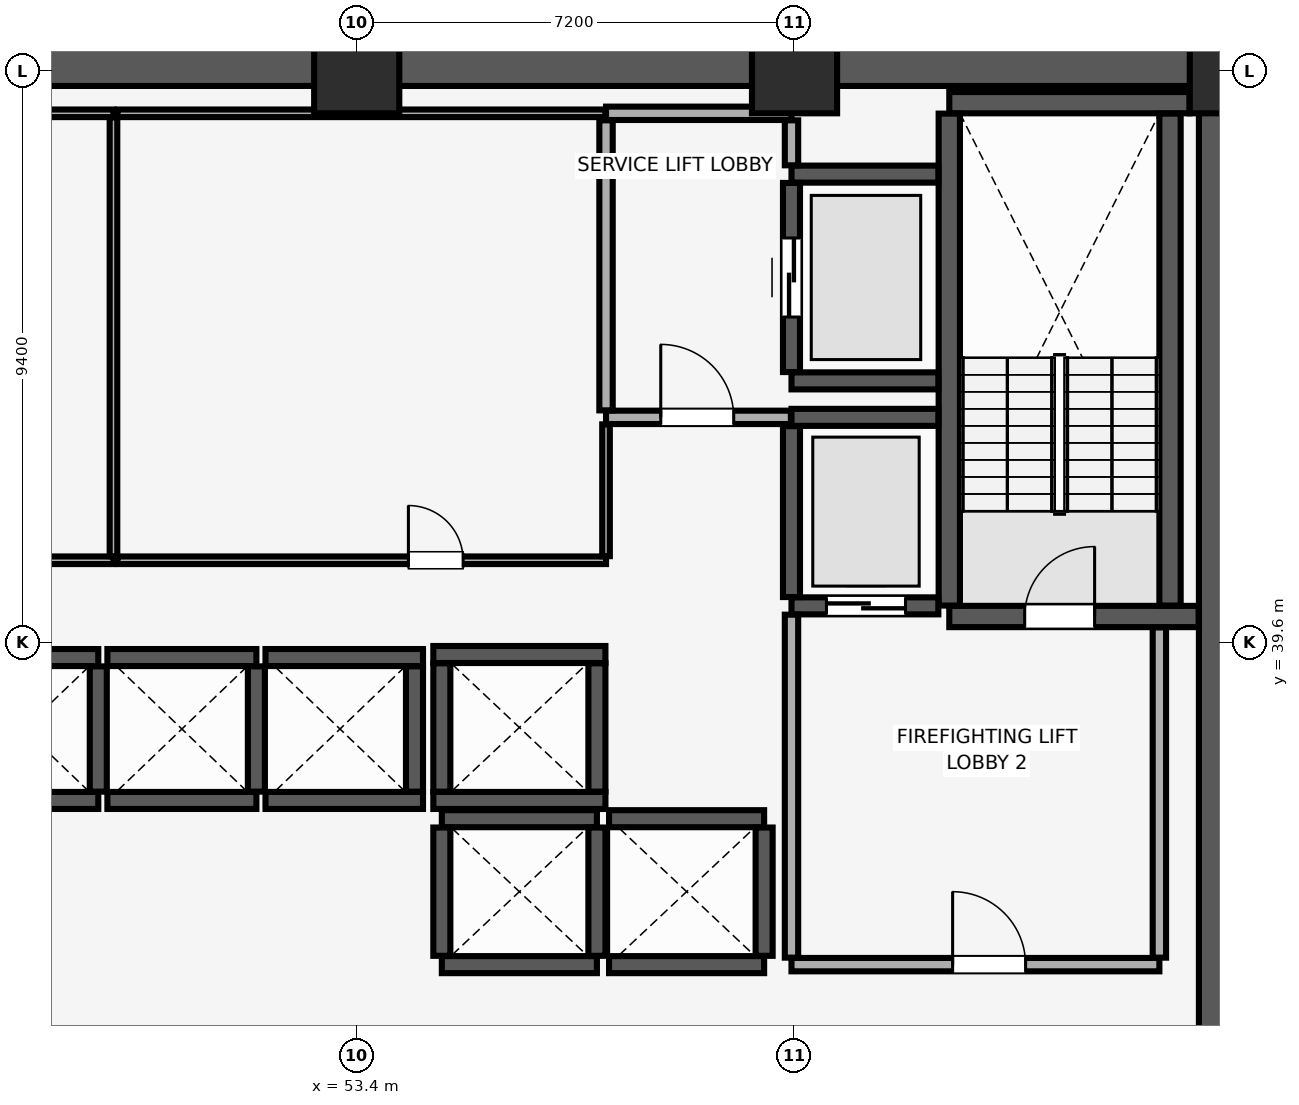
"""IFC4 building model, lengths in metres.
Left out: names, types, materials, properties, quantities, classifications, styles, units other than length and angle.
Written with IfcOpenShell. Run it as: python <this file> out.ifc"""

import sys

from ifc_helpers import new_model, si_unit, direction, frame, frame_2d, origin, origin_2d, place, context, subcontext, project, spatial, rectangle, extrude, element, fill, save


model = new_model("IFC4")
c1 = context("Model", 3, precision=1e-05, world=origin(), true_north=direction((0.0, 1.0)))
c2 = subcontext(c1, "Body", "Model", "MODEL_VIEW")
j1 = project(units=[si_unit("LENGTHUNIT", "METRE"), si_unit("PLANEANGLEUNIT", "RADIAN")], contexts=[c1])
p1 = place(None, origin())
s1 = spatial("IfcSite", under=j1, at=p1, CompositionType="ELEMENT")
p2 = place(p1, origin())
s2 = spatial("IfcBuilding", under=s1, at=p2, CompositionType="ELEMENT")
p3 = place(p2, frame((0.0, 0.0, 19.4)))
s3 = spatial("IfcBuildingStorey", under=s2, at=p3, CompositionType="ELEMENT", Elevation=19.4)
for number, where, z_axis, x_axis in (
    (1, (53.4, 49.0, 0.0), (0.0, 0.0, 1.0), (1.0, 0.0, 0.0)),
    (2, (60.6, 49.0, 0.0), (0.0, 0.0, 1.0), (1.0, 0.0, 0.0)),
    (3, (67.8, 49.0, 0.0), (0.0, 0.0, 1.0), (1.0, 0.0, 0.0)),
):
    element("IfcColumn", number, at=place(p3, frame(where, z_axis=z_axis, x_axis=x_axis)), inside=s3, PredefinedType="COLUMN", context=c2, shape_type="SweptSolid", body=[
        extrude(rectangle(XDim=1.4, YDim=1.4, at=origin_2d()), origin(), (0.0, 0.0, 1.0), 6.28),
    ])
p4 = place(p3, frame((16.2, 49.3, 0.0), z_axis=(0.0, 0.0, 1.0), x_axis=(1.0, 0.0, 0.0)))
e4 = element("IfcWall", 4, at=p4, inside=s3, PredefinedType="SHEAR", context=c2, shape_type="SweptSolid", body=[
    extrude(rectangle(XDim=51.6, YDim=1.1, at=frame_2d((25.8, 0.0))), origin(), (0.0, 0.0, 1.0), 6.28),
])
p5 = place(p3, frame((67.8, 29.4, 0.0), z_axis=(0.0, 0.0, 1.0), x_axis=(0.0, 1.0, 0.0)))
e5 = element("IfcWall", 5, at=p5, inside=s3, PredefinedType="SHEAR", context=c2, shape_type="SweptSolid", body=[
    extrude(rectangle(XDim=19.2, YDim=1.1, at=frame_2d((9.6, 0.0))), origin(), (0.0, 0.0, 1.0), 6.28),
])
p6 = place(p3, frame((63.145, 40.025, 0.0), z_axis=(0.0, 0.0, 1.0), x_axis=(1.0, 0.0, 0.0)))
e6 = element("IfcWall", 6, at=p6, inside=s3, PredefinedType="SHEAR", context=c2, shape_type="SweptSolid", body=[
    extrude(rectangle(XDim=4.1, YDim=0.35, at=frame_2d((2.05, 0.0))), origin(), (0.0, 0.0, 1.0), 6.28),
])
p7 = place(p6, frame((1.24, 0.0, 0.0)))
e7 = element("IfcOpeningElement", 7, at=p7, cuts=e6, PredefinedType="OPENING", context=c2, shape_type="SweptSolid", body=[
    extrude(rectangle(XDim=1.15, YDim=2.15, at=frame_2d((0.575, 1.075))), frame((0.0, 0.185, 0.0), z_axis=(0.0, -1.0, 0.0), x_axis=(1.0, 0.0, 0.0)), (0.0, 0.0, 1.0), 0.37),
])
p8 = place(p3, frame((63.145, 48.475, 0.0), z_axis=(0.0, 0.0, 1.0), x_axis=(1.0, 0.0, 0.0)))
e8 = element("IfcWall", 8, at=p8, inside=s3, PredefinedType="SHEAR", context=c2, shape_type="SweptSolid", body=[
    extrude(rectangle(XDim=3.95, YDim=0.35, at=frame_2d((1.975, 0.0))), origin(), (0.0, 0.0, 1.0), 6.28),
])
for number, where, z_axis, x_axis in (
    (9, (63.145, 40.205, 0.0), (0.0, 0.0, 1.0), (0.0, 1.0, 0.0)),
    (10, (66.775, 40.205, 0.0), (0.0, 0.0, 1.0), (0.0, 1.0, 0.0)),
):
    element("IfcWall", number, at=place(p3, frame(where, z_axis=z_axis, x_axis=x_axis)), inside=s3, PredefinedType="SHEAR", context=c2, shape_type="SweptSolid", body=[
        extrude(rectangle(XDim=8.09, YDim=0.35, at=frame_2d((4.045, 0.0))), origin(), (0.0, 0.0, 1.0), 6.28),
    ])
for number, where, z_axis, x_axis in (
    (11, (46.7, 37.0, 0.0), (0.0, 0.0, 1.0), (1.0, 0.0, 0.0)),
    (12, (46.7, 39.35, 0.0), (0.0, 0.0, 1.0), (1.0, 0.0, 0.0)),
):
    element("IfcWall", number, at=place(p3, frame(where, z_axis=z_axis, x_axis=x_axis)), inside=s3, PredefinedType="SHEAR", context=c2, shape_type="SweptSolid", body=[
        extrude(rectangle(XDim=2.45, YDim=0.28, at=frame_2d((1.225, 0.0))), origin(), (0.0, 0.0, 1.0), 6.28),
    ])
p9 = place(p3, frame((49.15, 37.145, 0.0), z_axis=(0.0, 0.0, 1.0), x_axis=(0.0, 1.0, 0.0)))
e13 = element("IfcWall", 13, at=p9, inside=s3, PredefinedType="SHEAR", context=c2, shape_type="SweptSolid", body=[
    extrude(rectangle(XDim=2.06, YDim=0.28, at=frame_2d((1.03, 0.0))), origin(), (0.0, 0.0, 1.0), 6.28),
])
for number, where, z_axis, x_axis in (
    (14, (49.3, 37.0, 0.0), (0.0, 0.0, 1.0), (1.0, 0.0, 0.0)),
    (15, (49.3, 39.35, 0.0), (0.0, 0.0, 1.0), (1.0, 0.0, 0.0)),
):
    element("IfcWall", number, at=place(p3, frame(where, z_axis=z_axis, x_axis=x_axis)), inside=s3, PredefinedType="SHEAR", context=c2, shape_type="SweptSolid", body=[
        extrude(rectangle(XDim=2.45, YDim=0.28, at=frame_2d((1.225, 0.0))), origin(), (0.0, 0.0, 1.0), 6.28),
    ])
p10 = place(p3, frame((51.75, 37.145, 0.0), z_axis=(0.0, 0.0, 1.0), x_axis=(0.0, 1.0, 0.0)))
e16 = element("IfcWall", 16, at=p10, inside=s3, PredefinedType="SHEAR", context=c2, shape_type="SweptSolid", body=[
    extrude(rectangle(XDim=2.06, YDim=0.28, at=frame_2d((1.03, 0.0))), origin(), (0.0, 0.0, 1.0), 6.28),
])
for number, where, z_axis, x_axis in (
    (17, (51.9, 37.0, 0.0), (0.0, 0.0, 1.0), (1.0, 0.0, 0.0)),
    (18, (51.9, 39.35, 0.0), (0.0, 0.0, 1.0), (1.0, 0.0, 0.0)),
):
    element("IfcWall", number, at=place(p3, frame(where, z_axis=z_axis, x_axis=x_axis)), inside=s3, PredefinedType="SHEAR", context=c2, shape_type="SweptSolid", body=[
        extrude(rectangle(XDim=2.59, YDim=0.28, at=frame_2d((1.295, 0.0))), origin(), (0.0, 0.0, 1.0), 6.28),
    ])
p11 = place(p3, frame((54.35, 37.145, 0.0), z_axis=(0.0, 0.0, 1.0), x_axis=(0.0, 1.0, 0.0)))
e19 = element("IfcWall", 19, at=p11, inside=s3, PredefinedType="SHEAR", context=c2, shape_type="SweptSolid", body=[
    extrude(rectangle(XDim=2.06, YDim=0.28, at=frame_2d((1.03, 0.0))), origin(), (0.0, 0.0, 1.0), 6.28),
])
for number, where, z_axis, x_axis in (
    (20, (54.8, 34.3, 0.0), (0.0, 0.0, 1.0), (1.0, 0.0, 0.0)),
    (21, (54.8, 36.7, 0.0), (0.0, 0.0, 1.0), (1.0, 0.0, 0.0)),
):
    element("IfcWall", number, at=place(p3, frame(where, z_axis=z_axis, x_axis=x_axis)), inside=s3, PredefinedType="SHEAR", context=c2, shape_type="SweptSolid", body=[
        extrude(rectangle(XDim=2.55, YDim=0.28, at=frame_2d((1.275, 0.0))), origin(), (0.0, 0.0, 1.0), 6.28),
    ])
for number, where, z_axis, x_axis in (
    (22, (54.8, 34.445, 0.0), (0.0, 0.0, 1.0), (0.0, 1.0, 0.0)),
    (23, (57.35, 34.445, 0.0), (0.0, 0.0, 1.0), (0.0, 1.0, 0.0)),
):
    element("IfcWall", number, at=place(p3, frame(where, z_axis=z_axis, x_axis=x_axis)), inside=s3, PredefinedType="SHEAR", context=c2, shape_type="SweptSolid", body=[
        extrude(rectangle(XDim=2.11, YDim=0.28, at=frame_2d((1.055, 0.0))), origin(), (0.0, 0.0, 1.0), 6.28),
    ])
for number, where, z_axis, x_axis in (
    (24, (57.55, 34.3, 0.0), (0.0, 0.0, 1.0), (1.0, 0.0, 0.0)),
    (25, (57.55, 36.7, 0.0), (0.0, 0.0, 1.0), (1.0, 0.0, 0.0)),
):
    element("IfcWall", number, at=place(p3, frame(where, z_axis=z_axis, x_axis=x_axis)), inside=s3, PredefinedType="SHEAR", context=c2, shape_type="SweptSolid", body=[
        extrude(rectangle(XDim=2.55, YDim=0.28, at=frame_2d((1.275, 0.0))), origin(), (0.0, 0.0, 1.0), 6.28),
    ])
p12 = place(p3, frame((60.1, 34.445, 0.0), z_axis=(0.0, 0.0, 1.0), x_axis=(0.0, 1.0, 0.0)))
e26 = element("IfcWall", 26, at=p12, inside=s3, PredefinedType="SHEAR", context=c2, shape_type="SweptSolid", body=[
    extrude(rectangle(XDim=2.11, YDim=0.28, at=frame_2d((1.055, 0.0))), origin(), (0.0, 0.0, 1.0), 6.28),
])
for number, where, z_axis, x_axis in (
    (27, (54.66, 37.0, 0.0), (0.0, 0.0, 1.0), (1.0, 0.0, 0.0)),
    (28, (54.66, 39.4, 0.0), (0.0, 0.0, 1.0), (1.0, 0.0, 0.0)),
):
    element("IfcWall", number, at=place(p3, frame(where, z_axis=z_axis, x_axis=x_axis)), inside=s3, PredefinedType="SHEAR", context=c2, shape_type="SweptSolid", body=[
        extrude(rectangle(XDim=2.83, YDim=0.28, at=frame_2d((1.415, 0.0))), origin(), (0.0, 0.0, 1.0), 6.28),
    ])
for number, where, z_axis, x_axis in (
    (29, (54.8, 37.145, 0.0), (0.0, 0.0, 1.0), (0.0, 1.0, 0.0)),
    (30, (57.35, 37.145, 0.0), (0.0, 0.0, 1.0), (0.0, 1.0, 0.0)),
):
    element("IfcWall", number, at=place(p3, frame(where, z_axis=z_axis, x_axis=x_axis)), inside=s3, PredefinedType="SHEAR", context=c2, shape_type="SweptSolid", body=[
        extrude(rectangle(XDim=2.11, YDim=0.28, at=frame_2d((1.055, 0.0))), origin(), (0.0, 0.0, 1.0), 6.28),
    ])
p13 = place(p3, frame((60.55, 40.2, 0.0), z_axis=(0.0, 0.0, 1.0), x_axis=(1.0, 0.0, 0.0)))
e31 = element("IfcWall", 31, at=p13, inside=s3, PredefinedType="SHEAR", context=c2, shape_type="SweptSolid", body=[
    extrude(rectangle(XDim=2.415, YDim=0.28, at=frame_2d((1.208, 0.0))), origin(), (0.0, 0.0, 1.0), 6.28),
])
p14 = place(p13, frame((0.575, 0.0, 0.0)))
e32 = element("IfcOpeningElement", 32, at=p14, cuts=e31, PredefinedType="OPENING", context=c2, shape_type="SweptSolid", body=[
    extrude(rectangle(XDim=1.3, YDim=2.3, at=frame_2d((0.65, 1.15))), frame((0.0, 0.15, 0.0), z_axis=(0.0, -1.0, 0.0), x_axis=(1.0, 0.0, 0.0)), (0.0, 0.0, 1.0), 0.3),
])
p15 = place(p3, frame((60.55, 43.3, 0.0), z_axis=(0.0, 0.0, 1.0), x_axis=(1.0, 0.0, 0.0)))
e33 = element("IfcWall", 33, at=p15, inside=s3, PredefinedType="SHEAR", context=c2, shape_type="SweptSolid", body=[
    extrude(rectangle(XDim=2.415, YDim=0.28, at=frame_2d((1.208, 0.0))), origin(), (0.0, 0.0, 1.0), 6.28),
])
p16 = place(p3, frame((60.55, 40.345, 0.0), z_axis=(0.0, 0.0, 1.0), x_axis=(0.0, 1.0, 0.0)))
e34 = element("IfcWall", 34, at=p16, inside=s3, PredefinedType="SHEAR", context=c2, shape_type="SweptSolid", body=[
    extrude(rectangle(XDim=2.81, YDim=0.28, at=frame_2d((1.405, 0.0))), origin(), (0.0, 0.0, 1.0), 6.28),
])
for number, where, z_axis, x_axis in (
    (35, (60.55, 43.9, 0.0), (0.0, 0.0, 1.0), (1.0, 0.0, 0.0)),
    (36, (60.55, 47.3, 0.0), (0.0, 0.0, 1.0), (1.0, 0.0, 0.0)),
):
    element("IfcWall", number, at=place(p3, frame(where, z_axis=z_axis, x_axis=x_axis)), inside=s3, PredefinedType="SHEAR", context=c2, shape_type="SweptSolid", body=[
        extrude(rectangle(XDim=2.415, YDim=0.28, at=frame_2d((1.208, 0.0))), origin(), (0.0, 0.0, 1.0), 6.28),
    ])
p17 = place(p3, frame((60.55, 44.045, 0.0), z_axis=(0.0, 0.0, 1.0), x_axis=(0.0, 1.0, 0.0)))
e37 = element("IfcWall", 37, at=p17, inside=s3, PredefinedType="SHEAR", context=c2, shape_type="SweptSolid", body=[
    extrude(rectangle(XDim=3.11, YDim=0.28, at=frame_2d((1.555, 0.0))), origin(), (0.0, 0.0, 1.0), 6.28),
])
p18 = place(p17, frame((0.905, 0.0, 0.0)))
e38 = element("IfcOpeningElement", 38, at=p18, cuts=e37, PredefinedType="OPENING", context=c2, shape_type="SweptSolid", body=[
    extrude(rectangle(XDim=1.3, YDim=2.3, at=frame_2d((0.65, 1.15))), frame((0.0, 0.15, 0.0), z_axis=(0.0, -1.0, 0.0), x_axis=(1.0, 0.0, 0.0)), (0.0, 0.0, 1.0), 0.3),
])
p19 = place(p3, frame((60.55, 34.3, 0.0), z_axis=(0.0, 0.0, 1.0), x_axis=(1.0, 0.0, 0.0)))
e39 = element("IfcWall", 39, at=p19, inside=s3, PredefinedType="PARTITIONING", context=c2, shape_type="SweptSolid", body=[
    extrude(rectangle(XDim=6.05, YDim=0.22, at=frame_2d((3.025, 0.0))), origin(), (0.0, 0.0, 1.0), 6.28),
])
p20 = place(p19, frame((2.65, 0.0, 0.0)))
e40 = element("IfcOpeningElement", 40, at=p20, cuts=e39, PredefinedType="OPENING", context=c2, shape_type="SweptSolid", body=[
    extrude(rectangle(XDim=1.2, YDim=2.15, at=frame_2d((0.6, 1.075))), frame((0.0, 0.12, 0.0), z_axis=(0.0, -1.0, 0.0), x_axis=(1.0, 0.0, 0.0)), (0.0, 0.0, 1.0), 0.24),
])
p21 = place(p3, frame((60.55, 34.415, 0.0), z_axis=(0.0, 0.0, 1.0), x_axis=(0.0, 1.0, 0.0)))
e41 = element("IfcWall", 41, at=p21, inside=s3, PredefinedType="PARTITIONING", context=c2, shape_type="SweptSolid", body=[
    extrude(rectangle(XDim=5.64, YDim=0.22, at=frame_2d((2.82, 0.0))), origin(), (0.0, 0.0, 1.0), 6.28),
])
p22 = place(p3, frame((66.6, 34.415, 0.0), z_axis=(0.0, 0.0, 1.0), x_axis=(0.0, 1.0, 0.0)))
e42 = element("IfcWall", 42, at=p22, inside=s3, PredefinedType="PARTITIONING", context=c2, shape_type="SweptSolid", body=[
    extrude(rectangle(XDim=5.43, YDim=0.22, at=frame_2d((2.715, 0.0))), origin(), (0.0, 0.0, 1.0), 6.28),
])
p23 = place(p3, frame((57.5, 43.3, 0.0), z_axis=(0.0, 0.0, 1.0), x_axis=(1.0, 0.0, 0.0)))
e43 = element("IfcWall", 43, at=p23, inside=s3, PredefinedType="PARTITIONING", context=c2, shape_type="SweptSolid", body=[
    extrude(rectangle(XDim=3.04, YDim=0.22, at=frame_2d((1.52, 0.0))), origin(), (0.0, 0.0, 1.0), 6.28),
])
p24 = place(p23, frame((0.9, 0.0, 0.0)))
e44 = element("IfcOpeningElement", 44, at=p24, cuts=e43, PredefinedType="OPENING", context=c2, shape_type="SweptSolid", body=[
    extrude(rectangle(XDim=1.2, YDim=2.15, at=frame_2d((0.6, 1.075))), frame((0.0, 0.12, 0.0), z_axis=(0.0, -1.0, 0.0), x_axis=(1.0, 0.0, 0.0)), (0.0, 0.0, 1.0), 0.24),
])
p25 = place(p3, frame((57.5, 48.3, 0.0), z_axis=(0.0, 0.0, 1.0), x_axis=(1.0, 0.0, 0.0)))
e45 = element("IfcWall", 45, at=p25, inside=s3, PredefinedType="PARTITIONING", context=c2, shape_type="SweptSolid", body=[
    extrude(rectangle(XDim=3.05, YDim=0.22, at=frame_2d((1.525, 0.0))), origin(), (0.0, 0.0, 1.0), 6.28),
])
p26 = place(p3, frame((57.5, 43.415, 0.0), z_axis=(0.0, 0.0, 1.0), x_axis=(0.0, 1.0, 0.0)))
e46 = element("IfcWall", 46, at=p26, inside=s3, PredefinedType="PARTITIONING", context=c2, shape_type="SweptSolid", body=[
    extrude(rectangle(XDim=4.77, YDim=0.22, at=frame_2d((2.385, 0.0))), origin(), (0.0, 0.0, 1.0), 6.28),
])
p27 = place(p3, frame((60.55, 47.445, 0.0), z_axis=(0.0, 0.0, 1.0), x_axis=(0.0, 1.0, 0.0)))
e47 = element("IfcWall", 47, at=p27, inside=s3, PredefinedType="PARTITIONING", context=c2, shape_type="SweptSolid", body=[
    extrude(rectangle(XDim=0.74, YDim=0.22, at=frame_2d((0.37, 0.0))), origin(), (0.0, 0.0, 1.0), 6.28),
])
p28 = place(p3, frame((44.3, 40.95, 0.0), z_axis=(0.0, 0.0, 1.0), x_axis=(1.0, 0.0, 0.0)))
e48 = element("IfcWall", 48, at=p28, inside=s3, PredefinedType="PARTITIONING", context=c2, shape_type="SweptSolid", body=[
    extrude(rectangle(XDim=5.1, YDim=0.125, at=frame_2d((2.55, 0.0))), origin(), (0.0, 0.0, 1.0), 6.28),
])
p29 = place(p28, frame((2.85, 0.0, 0.0)))
e49 = element("IfcOpeningElement", 49, at=p29, cuts=e48, PredefinedType="OPENING", context=c2, shape_type="SweptSolid", body=[
    extrude(rectangle(XDim=0.9, YDim=2.1, at=frame_2d((0.45, 1.05))), frame((0.0, 0.073, 0.0), z_axis=(0.0, -1.0, 0.0), x_axis=(1.0, 0.0, 0.0)), (0.0, 0.0, 1.0), 0.145),
])
p30 = place(p3, frame((44.3, 48.3, 0.0), z_axis=(0.0, 0.0, 1.0), x_axis=(1.0, 0.0, 0.0)))
e50 = element("IfcWall", 50, at=p30, inside=s3, PredefinedType="PARTITIONING", context=c2, shape_type="SweptSolid", body=[
    extrude(rectangle(XDim=5.1, YDim=0.125, at=frame_2d((2.55, 0.0))), origin(), (0.0, 0.0, 1.0), 6.28),
])
p31 = place(p3, frame((49.4, 41.018, 0.0), z_axis=(0.0, 0.0, 1.0), x_axis=(0.0, 1.0, 0.0)))
e51 = element("IfcWall", 51, at=p31, inside=s3, PredefinedType="PARTITIONING", context=c2, shape_type="SweptSolid", body=[
    extrude(rectangle(XDim=7.215, YDim=0.125, at=frame_2d((3.607, 0.0))), origin(), (0.0, 0.0, 1.0), 6.28),
])
p32 = place(p3, frame((49.468, 40.95, 0.0), z_axis=(0.0, 0.0, 1.0), x_axis=(1.0, 0.0, 0.0)))
e52 = element("IfcWall", 52, at=p32, inside=s3, PredefinedType="PARTITIONING", context=c2, shape_type="SweptSolid", body=[
    extrude(rectangle(XDim=8.032, YDim=0.125, at=frame_2d((4.016, 0.0))), origin(), (0.0, 0.0, 1.0), 6.28),
])
p33 = place(p32, frame((4.782, 0.0, 0.0)))
e53 = element("IfcOpeningElement", 53, at=p33, cuts=e52, PredefinedType="OPENING", context=c2, shape_type="SweptSolid", body=[
    extrude(rectangle(XDim=0.9, YDim=2.1, at=frame_2d((0.45, 1.05))), frame((0.0, 0.073, 0.0), z_axis=(0.0, -1.0, 0.0), x_axis=(1.0, 0.0, 0.0)), (0.0, 0.0, 1.0), 0.145),
])
p34 = place(p3, frame((49.468, 48.3, 0.0), z_axis=(0.0, 0.0, 1.0), x_axis=(1.0, 0.0, 0.0)))
e54 = element("IfcWall", 54, at=p34, inside=s3, PredefinedType="PARTITIONING", context=c2, shape_type="SweptSolid", body=[
    extrude(rectangle(XDim=8.022, YDim=0.125, at=frame_2d((4.011, 0.0))), origin(), (0.0, 0.0, 1.0), 6.28),
])
p35 = place(p3, frame((57.5, 41.018, 0.0), z_axis=(0.0, 0.0, 1.0), x_axis=(0.0, 1.0, 0.0)))
e55 = element("IfcWall", 55, at=p35, inside=s3, PredefinedType="PARTITIONING", context=c2, shape_type="SweptSolid", body=[
    extrude(rectangle(XDim=2.167, YDim=0.125, at=frame_2d((1.084, 0.0))), origin(), (0.0, 0.0, 1.0), 6.28),
])
p36 = place(p7, origin())
e56 = element("IfcDoor", 56, at=p36, inside=s3, OperationType="SINGLE_SWING_RIGHT", PredefinedType="DOOR", context=c2, shape_type="SweptSolid", body=[
    extrude(rectangle(XDim=1.15, YDim=2.15, at=frame_2d((0.575, 1.075))), frame((0.0, 0.025, 0.0), z_axis=(0.0, -1.0, 0.0), x_axis=(1.0, 0.0, 0.0)), (0.0, 0.0, 1.0), 0.05),
])
fill(e7, e56)
p37 = place(p14, origin())
e57 = element("IfcDoor", 57, at=p37, inside=s3, OperationType="DOUBLE_DOOR_SLIDING", PredefinedType="DOOR", context=c2, shape_type="SweptSolid", body=[
    extrude(rectangle(XDim=1.3, YDim=2.3, at=frame_2d((0.65, 1.15))), frame((0.0, 0.025, 0.0), z_axis=(0.0, -1.0, 0.0), x_axis=(1.0, 0.0, 0.0)), (0.0, 0.0, 1.0), 0.05),
])
fill(e32, e57)
p38 = place(p18, origin())
e58 = element("IfcDoor", 58, at=p38, inside=s3, OperationType="DOUBLE_DOOR_SLIDING", PredefinedType="DOOR", context=c2, shape_type="SweptSolid", body=[
    extrude(rectangle(XDim=1.3, YDim=2.3, at=frame_2d((0.65, 1.15))), frame((0.0, 0.025, 0.0), z_axis=(0.0, -1.0, 0.0), x_axis=(1.0, 0.0, 0.0)), (0.0, 0.0, 1.0), 0.05),
])
fill(e38, e58)
p39 = place(p20, origin())
e59 = element("IfcDoor", 59, at=p39, inside=s3, OperationType="SINGLE_SWING_LEFT", PredefinedType="DOOR", context=c2, shape_type="SweptSolid", body=[
    extrude(rectangle(XDim=1.2, YDim=2.15, at=frame_2d((0.6, 1.075))), frame((0.0, 0.025, 0.0), z_axis=(0.0, -1.0, 0.0), x_axis=(1.0, 0.0, 0.0)), (0.0, 0.0, 1.0), 0.05),
])
fill(e40, e59)
p40 = place(p24, origin())
e60 = element("IfcDoor", 60, at=p40, inside=s3, OperationType="SINGLE_SWING_LEFT", PredefinedType="DOOR", context=c2, shape_type="SweptSolid", body=[
    extrude(rectangle(XDim=1.2, YDim=2.15, at=frame_2d((0.6, 1.075))), frame((0.0, 0.025, 0.0), z_axis=(0.0, -1.0, 0.0), x_axis=(1.0, 0.0, 0.0)), (0.0, 0.0, 1.0), 0.05),
])
fill(e44, e60)
p41 = place(p33, origin())
e61 = element("IfcDoor", 61, at=p41, inside=s3, OperationType="SINGLE_SWING_LEFT", PredefinedType="DOOR", context=c2, shape_type="SweptSolid", body=[
    extrude(rectangle(XDim=0.9, YDim=2.1, at=frame_2d((0.45, 1.05))), frame((0.0, 0.025, 0.0), z_axis=(0.0, -1.0, 0.0), x_axis=(1.0, 0.0, 0.0)), (0.0, 0.0, 1.0), 0.05),
])
fill(e53, e61)
save(model, sys.argv[1])
